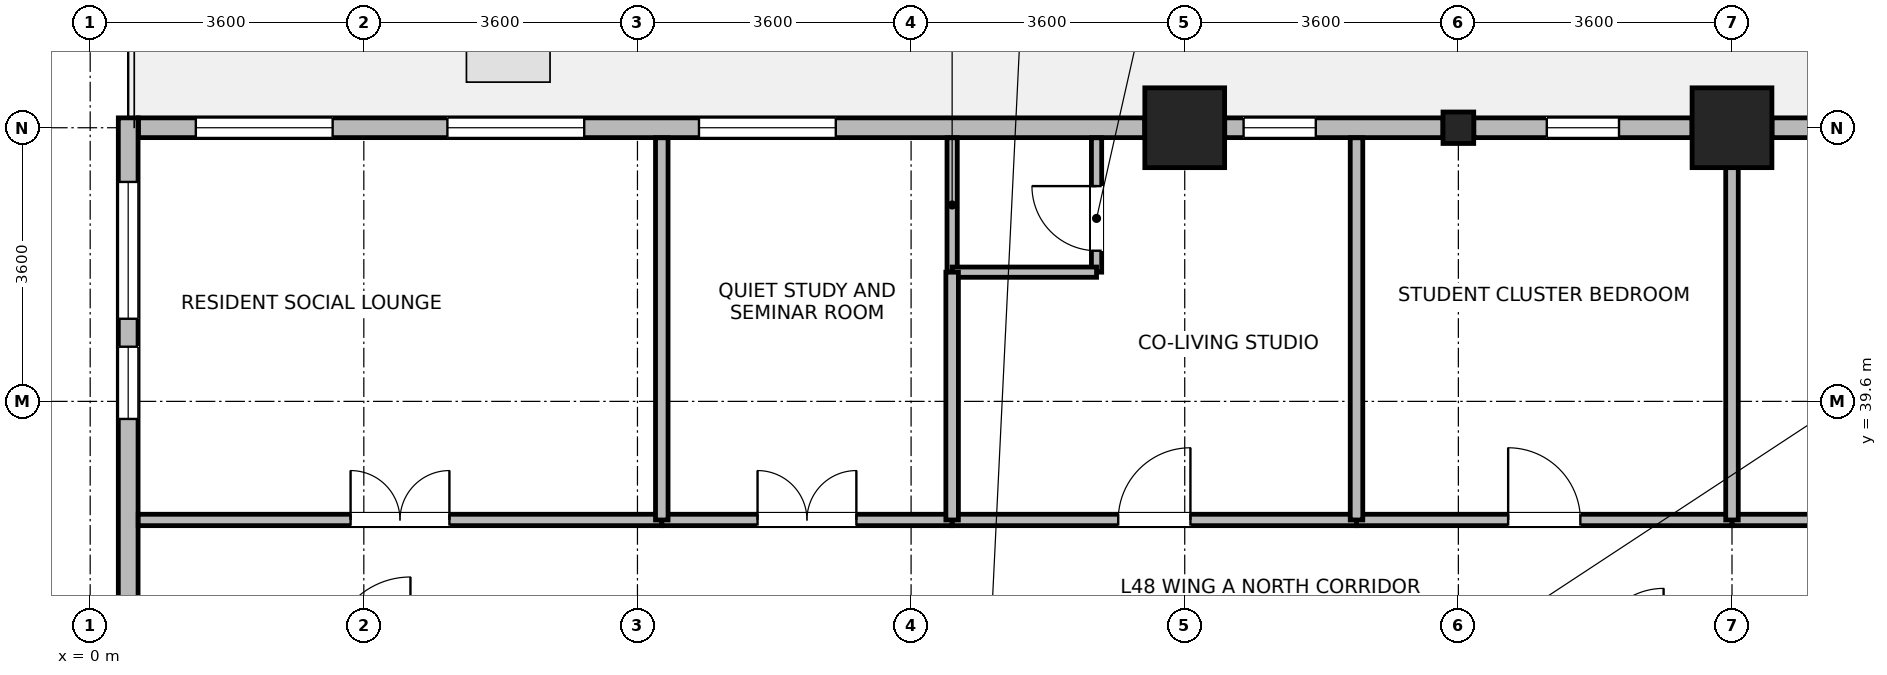
"""IFC4 building model, lengths in metres.
Left out: names, types, materials, properties, quantities, classifications, styles, units other than length and angle.
Written with IfcOpenShell. Run it as: python <this file> out.ifc"""

import sys

from ifc_helpers import new_model, si_unit, direction, frame, frame_2d, origin, origin_2d, place, context, subcontext, project, spatial, rectangle, i_section, extrude, source, transform, mapped, element, fill, save


model = new_model("IFC4")
c1 = context("Model", 3, precision=1e-05, world=origin(), true_north=direction((0.0, 1.0)))
c2 = subcontext(c1, "Body", "Model", "MODEL_VIEW")
j1 = project(units=[si_unit("LENGTHUNIT", "METRE"), si_unit("PLANEANGLEUNIT", "RADIAN")], contexts=[c1])
p1 = place(None, origin())
s1 = spatial("IfcSite", under=j1, at=p1, CompositionType="ELEMENT")
p2 = place(p1, origin())
s2 = spatial("IfcBuilding", under=s1, at=p2, CompositionType="ELEMENT")
p3 = place(p2, frame((0.0, 0.0, 188.3)))
s3 = spatial("IfcBuildingStorey", under=s2, at=p3, CompositionType="ELEMENT", Elevation=188.3)
m1 = source(origin(), c2, "Body", "SweptSolid", [
    extrude(rectangle(XDim=1.05, YDim=1.05, at=origin_2d()), origin(), (0.0, 0.0, 1.0), 3.7),
])
for number, where, z_axis, x_axis in (
    (1, (14.4, 43.2, 0.0), (0.0, 0.0, 1.0), (1.0, 0.0, 0.0)),
    (2, (21.6, 43.2, 0.0), (0.0, 0.0, 1.0), (1.0, 0.0, 0.0)),
):
    element("IfcColumn", number, at=place(p3, frame(where, z_axis=z_axis, x_axis=x_axis)), inside=s3, PredefinedType="COLUMN", context=c2, shape_type="MappedRepresentation", body=[
        mapped(m1, transform((0.0, 0.0, 0.0), x_axis=(1.0, 0.0, 0.0), y_axis=(0.0, 1.0, 0.0), z_axis=(0.0, 0.0, 1.0), scale=1.0)),
    ])
m2 = source(origin(), c2, "Body", "SweptSolid", [
    extrude(i_section(OverallWidth=0.404, OverallDepth=0.414, WebThickness=0.021, FlangeThickness=0.028, FilletRadius=0.015, at=origin_2d()), origin(), (0.0, 0.0, 1.0), 3.7),
])
p4 = place(p3, frame((18.0, 43.2, 0.0), z_axis=(0.0, 0.0, 1.0), x_axis=(1.0, 0.0, 0.0)))
e3 = element("IfcColumn", 3, at=p4, inside=s3, PredefinedType="COLUMN", context=c2, shape_type="MappedRepresentation", body=[
    mapped(m2, transform((0.0, 0.0, 0.0), x_axis=(1.0, 0.0, 0.0), y_axis=(0.0, 1.0, 0.0), z_axis=(0.0, 0.0, 1.0), scale=1.0)),
])
p5 = place(p3, frame((22.126, 43.2, 0.0), z_axis=(0.0, 0.0, 1.0), x_axis=(1.0, 0.0, 0.0)))
e4 = element("IfcWall", 4, at=p5, inside=s3, PredefinedType="STANDARD", context=c2, shape_type="SweptSolid", body=[
    extrude(rectangle(XDim=2.871, YDim=0.26, at=frame_2d((1.436, 0.0))), origin(), (0.0, 0.0, 1.0), 2.87),
])
p6 = place(p5, frame((0.96, 0.0, 0.85)))
e5 = element("IfcOpeningElement", 5, at=p6, cuts=e4, PredefinedType="OPENING", context=c2, shape_type="SweptSolid", body=[
    extrude(rectangle(XDim=0.95, YDim=1.75, at=frame_2d((0.475, 0.875))), frame((0.0, 0.14, 0.0), z_axis=(0.0, -1.0, 0.0), x_axis=(1.0, 0.0, 0.0)), (0.0, 0.0, 1.0), 0.28),
])
p7 = place(p3, frame((18.203, 43.2, 0.0), z_axis=(0.0, 0.0, 1.0), x_axis=(1.0, 0.0, 0.0)))
e6 = element("IfcWall", 6, at=p7, inside=s3, PredefinedType="STANDARD", context=c2, shape_type="SweptSolid", body=[
    extrude(rectangle(XDim=2.871, YDim=0.26, at=frame_2d((1.436, 0.0))), origin(), (0.0, 0.0, 1.0), 2.87),
])
p8 = place(p7, frame((0.96, 0.0, 0.85)))
e7 = element("IfcOpeningElement", 7, at=p8, cuts=e6, PredefinedType="OPENING", context=c2, shape_type="SweptSolid", body=[
    extrude(rectangle(XDim=0.95, YDim=1.75, at=frame_2d((0.475, 0.875))), frame((0.0, 0.14, 0.0), z_axis=(0.0, -1.0, 0.0), x_axis=(1.0, 0.0, 0.0)), (0.0, 0.0, 1.0), 0.28),
])
p9 = place(p3, frame((14.926, 43.2, 0.0), z_axis=(0.0, 0.0, 1.0), x_axis=(1.0, 0.0, 0.0)))
e8 = element("IfcWall", 8, at=p9, inside=s3, PredefinedType="STANDARD", context=c2, shape_type="SweptSolid", body=[
    extrude(rectangle(XDim=2.871, YDim=0.26, at=frame_2d((1.436, 0.0))), origin(), (0.0, 0.0, 1.0), 2.87),
])
p10 = place(p9, frame((0.249, 0.0, 0.85)))
e9 = element("IfcOpeningElement", 9, at=p10, cuts=e8, PredefinedType="OPENING", context=c2, shape_type="SweptSolid", body=[
    extrude(rectangle(XDim=0.95, YDim=1.75, at=frame_2d((0.475, 0.875))), frame((0.0, 0.14, 0.0), z_axis=(0.0, -1.0, 0.0), x_axis=(1.0, 0.0, 0.0)), (0.0, 0.0, 1.0), 0.28),
])
p11 = place(p3, frame((0.635, 43.2, 0.0), z_axis=(0.0, 0.0, 1.0), x_axis=(1.0, 0.0, 0.0)))
e10 = element("IfcWall", 10, at=p11, inside=s3, PredefinedType="STANDARD", context=c2, shape_type="SweptSolid", body=[
    extrude(rectangle(XDim=13.239, YDim=0.26, at=frame_2d((6.62, 0.0))), origin(), (0.0, 0.0, 1.0), 3.32),
])
p12 = place(p11, frame((0.755, 0.0, 0.85)))
e11 = element("IfcOpeningElement", 11, at=p12, cuts=e10, PredefinedType="OPENING", context=c2, shape_type="SweptSolid", body=[
    extrude(rectangle(XDim=1.8, YDim=1.85, at=frame_2d((0.9, 0.925))), frame((0.0, 0.14, 0.0), z_axis=(0.0, -1.0, 0.0), x_axis=(1.0, 0.0, 0.0)), (0.0, 0.0, 1.0), 0.28),
])
p13 = place(p11, frame((4.065, 0.0, 0.85)))
e12 = element("IfcOpeningElement", 12, at=p13, cuts=e10, PredefinedType="OPENING", context=c2, shape_type="SweptSolid", body=[
    extrude(rectangle(XDim=1.8, YDim=1.85, at=frame_2d((0.9, 0.925))), frame((0.0, 0.14, 0.0), z_axis=(0.0, -1.0, 0.0), x_axis=(1.0, 0.0, 0.0)), (0.0, 0.0, 1.0), 0.28),
])
p14 = place(p11, frame((7.375, 0.0, 0.85)))
e13 = element("IfcOpeningElement", 13, at=p14, cuts=e10, PredefinedType="OPENING", context=c2, shape_type="SweptSolid", body=[
    extrude(rectangle(XDim=1.8, YDim=1.85, at=frame_2d((0.9, 0.925))), frame((0.0, 0.14, 0.0), z_axis=(0.0, -1.0, 0.0), x_axis=(1.0, 0.0, 0.0)), (0.0, 0.0, 1.0), 0.28),
])
p15 = place(p3, frame((0.5, 36.358, 0.0), z_axis=(0.0, 0.0, 1.0), x_axis=(0.0, 1.0, 0.0)))
e14 = element("IfcWall", 14, at=p15, inside=s3, PredefinedType="STANDARD", context=c2, shape_type="SweptSolid", body=[
    extrude(rectangle(XDim=6.972, YDim=0.26, at=frame_2d((3.486, 0.0))), origin(), (0.0, 0.0, 1.0), 3.32),
])
p16 = place(p15, frame((4.329, 0.0, 0.85)))
e15 = element("IfcOpeningElement", 15, at=p16, cuts=e14, PredefinedType="OPENING", context=c2, shape_type="SweptSolid", body=[
    extrude(rectangle(XDim=1.8, YDim=1.85, at=frame_2d((0.9, 0.925))), frame((0.0, 0.14, 0.0), z_axis=(0.0, -1.0, 0.0), x_axis=(1.0, 0.0, 0.0)), (0.0, 0.0, 1.0), 0.28),
])
p17 = place(p15, frame((3.011, 0.0, 0.85)))
e16 = element("IfcOpeningElement", 16, at=p17, cuts=e14, PredefinedType="OPENING", context=c2, shape_type="SweptSolid", body=[
    extrude(rectangle(XDim=0.95, YDim=1.75, at=frame_2d((0.475, 0.875))), frame((0.0, 0.14, 0.0), z_axis=(0.0, -1.0, 0.0), x_axis=(1.0, 0.0, 0.0)), (0.0, 0.0, 1.0), 0.28),
])
p18 = place(p3, frame((11.34, 41.3, 0.0), z_axis=(0.0, 0.0, 1.0), x_axis=(0.0, 1.0, 0.0)))
e17 = element("IfcWall", 17, at=p18, inside=s3, PredefinedType="PARTITIONING", context=c2, shape_type="SweptSolid", body=[
    extrude(rectangle(XDim=1.768, YDim=0.135, at=frame_2d((0.884, 0.0))), origin(), (0.0, 0.0, 1.0), 3.32),
])
p19 = place(p3, frame((13.24, 41.3, 0.0), z_axis=(0.0, 0.0, 1.0), x_axis=(0.0, 1.0, 0.0)))
e18 = element("IfcWall", 18, at=p19, inside=s3, PredefinedType="PARTITIONING", context=c2, shape_type="SweptSolid", body=[
    extrude(rectangle(XDim=1.768, YDim=0.135, at=frame_2d((0.884, 0.0))), origin(), (0.0, 0.0, 1.0), 3.32),
])
p20 = place(p19, frame((0.282, 0.0, 0.0)))
e19 = element("IfcOpeningElement", 19, at=p20, cuts=e18, PredefinedType="OPENING", context=c2, shape_type="SweptSolid", body=[
    extrude(rectangle(XDim=0.85, YDim=2.04, at=frame_2d((0.425, 1.02))), frame((0.0, 0.078, 0.0), z_axis=(0.0, -1.0, 0.0), x_axis=(1.0, 0.0, 0.0)), (0.0, 0.0, 1.0), 0.155),
])
p21 = place(p3, frame((11.34, 41.3, 0.0), z_axis=(0.0, 0.0, 1.0), x_axis=(1.0, 0.0, 0.0)))
e20 = element("IfcWall", 20, at=p21, inside=s3, PredefinedType="PARTITIONING", context=c2, shape_type="SweptSolid", body=[
    extrude(rectangle(XDim=1.9, YDim=0.135, at=frame_2d((0.95, 0.0))), origin(), (0.0, 0.0, 1.0), 3.32),
])
p22 = place(p3, frame((21.6, 38.04, 0.0), z_axis=(0.0, 0.0, 1.0), x_axis=(1.0, 0.0, 0.0)))
e21 = element("IfcWall", 21, at=p22, inside=s3, PredefinedType="PARTITIONING", context=c2, shape_type="SweptSolid", body=[
    extrude(rectangle(XDim=7.1, YDim=0.15, at=frame_2d((3.55, 0.0))), origin(), (0.0, 0.0, 1.0), 3.32),
])
p23 = place(p22, frame((3.1, 0.0, 0.0)))
e22 = element("IfcOpeningElement", 22, at=p23, cuts=e21, PredefinedType="OPENING", context=c2, shape_type="SweptSolid", body=[
    extrude(rectangle(XDim=0.9, YDim=2.08, at=frame_2d((0.45, 1.04))), frame((0.0, 0.085, 0.0), z_axis=(0.0, -1.0, 0.0), x_axis=(1.0, 0.0, 0.0)), (0.0, 0.0, 1.0), 0.17),
])
p24 = place(p3, frame((0.632, 38.04, 0.0), z_axis=(0.0, 0.0, 1.0), x_axis=(1.0, 0.0, 0.0)))
e23 = element("IfcWall", 23, at=p24, inside=s3, PredefinedType="PARTITIONING", context=c2, shape_type="SweptSolid", body=[
    extrude(rectangle(XDim=6.888, YDim=0.15, at=frame_2d((3.444, 0.0))), origin(), (0.0, 0.0, 1.0), 3.32),
])
p25 = place(p24, frame((2.794, 0.0, 0.0)))
e24 = element("IfcOpeningElement", 24, at=p25, cuts=e23, PredefinedType="OPENING", context=c2, shape_type="SweptSolid", body=[
    extrude(rectangle(XDim=1.3, YDim=2.12, at=frame_2d((0.65, 1.06))), frame((0.0, 0.085, 0.0), z_axis=(0.0, -1.0, 0.0), x_axis=(1.0, 0.0, 0.0)), (0.0, 0.0, 1.0), 0.17),
])
p26 = place(p3, frame((11.34, 38.04, 0.0), z_axis=(0.0, 0.0, 1.0), x_axis=(1.0, 0.0, 0.0)))
e25 = element("IfcWall", 25, at=p26, inside=s3, PredefinedType="PARTITIONING", context=c2, shape_type="SweptSolid", body=[
    extrude(rectangle(XDim=5.32, YDim=0.15, at=frame_2d((2.66, 0.0))), origin(), (0.0, 0.0, 1.0), 3.32),
])
p27 = place(p26, frame((2.185, 0.0, 0.0)))
e26 = element("IfcOpeningElement", 26, at=p27, cuts=e25, PredefinedType="OPENING", context=c2, shape_type="SweptSolid", body=[
    extrude(rectangle(XDim=0.95, YDim=2.1, at=frame_2d((0.475, 1.05))), frame((0.0, 0.085, 0.0), z_axis=(0.0, -1.0, 0.0), x_axis=(1.0, 0.0, 0.0)), (0.0, 0.0, 1.0), 0.17),
])
p28 = place(p3, frame((16.66, 38.04, 0.0), z_axis=(0.0, 0.0, 1.0), x_axis=(1.0, 0.0, 0.0)))
e27 = element("IfcWall", 27, at=p28, inside=s3, PredefinedType="PARTITIONING", context=c2, shape_type="SweptSolid", body=[
    extrude(rectangle(XDim=4.94, YDim=0.15, at=frame_2d((2.47, 0.0))), origin(), (0.0, 0.0, 1.0), 3.32),
])
p29 = place(p28, frame((1.995, 0.0, 0.0)))
e28 = element("IfcOpeningElement", 28, at=p29, cuts=e27, PredefinedType="OPENING", context=c2, shape_type="SweptSolid", body=[
    extrude(rectangle(XDim=0.95, YDim=2.1, at=frame_2d((0.475, 1.05))), frame((0.0, 0.085, 0.0), z_axis=(0.0, -1.0, 0.0), x_axis=(1.0, 0.0, 0.0)), (0.0, 0.0, 1.0), 0.17),
])
p30 = place(p3, frame((7.52, 38.04, 0.0), z_axis=(0.0, 0.0, 1.0), x_axis=(1.0, 0.0, 0.0)))
e29 = element("IfcWall", 29, at=p30, inside=s3, PredefinedType="PARTITIONING", context=c2, shape_type="SweptSolid", body=[
    extrude(rectangle(XDim=3.82, YDim=0.15, at=frame_2d((1.91, 0.0))), origin(), (0.0, 0.0, 1.0), 3.32),
])
p31 = place(p30, frame((1.26, 0.0, 0.0)))
e30 = element("IfcOpeningElement", 30, at=p31, cuts=e29, PredefinedType="OPENING", context=c2, shape_type="SweptSolid", body=[
    extrude(rectangle(XDim=1.3, YDim=2.12, at=frame_2d((0.65, 1.06))), frame((0.0, 0.085, 0.0), z_axis=(0.0, -1.0, 0.0), x_axis=(1.0, 0.0, 0.0)), (0.0, 0.0, 1.0), 0.17),
])
for number, where, z_axis, x_axis in (
    (31, (7.52, 38.04, 0.0), (0.0, 0.0, 1.0), (0.0, 1.0, 0.0)),
    (32, (16.66, 38.04, 0.0), (0.0, 0.0, 1.0), (0.0, 1.0, 0.0)),
):
    element("IfcWall", number, at=place(p3, frame(where, z_axis=z_axis, x_axis=x_axis)), inside=s3, PredefinedType="PARTITIONING", context=c2, shape_type="SweptSolid", body=[
        extrude(rectangle(XDim=5.028, YDim=0.165, at=frame_2d((2.514, 0.0))), origin(), (0.0, 0.0, 1.0), 3.32),
    ])
p32 = place(p3, frame((21.6, 38.04, 0.0), z_axis=(0.0, 0.0, 1.0), x_axis=(0.0, 1.0, 0.0)))
e33 = element("IfcWall", 33, at=p32, inside=s3, PredefinedType="PARTITIONING", context=c2, shape_type="SweptSolid", body=[
    extrude(rectangle(XDim=5.028, YDim=0.165, at=frame_2d((2.514, 0.0))), origin(), (0.0, 0.0, 1.0), 2.87),
])
p33 = place(p3, frame((11.34, 38.04, 0.0), z_axis=(0.0, 0.0, 1.0), x_axis=(0.0, 1.0, 0.0)))
e34 = element("IfcWall", 34, at=p33, inside=s3, PredefinedType="PARTITIONING", context=c2, shape_type="SweptSolid", body=[
    extrude(rectangle(XDim=3.26, YDim=0.165, at=frame_2d((1.63, 0.0))), origin(), (0.0, 0.0, 1.0), 3.32),
])
p34 = place(p8, origin())
e35 = element("IfcWindow", 35, at=p34, inside=s3, PartitioningType="SINGLE_PANEL", PredefinedType="WINDOW", context=c2, shape_type="SweptSolid", body=[
    extrude(rectangle(XDim=0.95, YDim=1.75, at=frame_2d((0.475, 0.875))), frame((0.0, 0.03, 0.0), z_axis=(0.0, -1.0, 0.0), x_axis=(1.0, 0.0, 0.0)), (0.0, 0.0, 1.0), 0.06),
])
fill(e7, e35)
p35 = place(p10, origin())
e36 = element("IfcWindow", 36, at=p35, inside=s3, PartitioningType="SINGLE_PANEL", PredefinedType="WINDOW", context=c2, shape_type="SweptSolid", body=[
    extrude(rectangle(XDim=0.95, YDim=1.75, at=frame_2d((0.475, 0.875))), frame((0.0, 0.03, 0.0), z_axis=(0.0, -1.0, 0.0), x_axis=(1.0, 0.0, 0.0)), (0.0, 0.0, 1.0), 0.06),
])
fill(e9, e36)
p36 = place(p12, origin())
e37 = element("IfcWindow", 37, at=p36, inside=s3, PartitioningType="SINGLE_PANEL", PredefinedType="WINDOW", context=c2, shape_type="SweptSolid", body=[
    extrude(rectangle(XDim=1.8, YDim=1.85, at=frame_2d((0.9, 0.925))), frame((0.0, 0.03, 0.0), z_axis=(0.0, -1.0, 0.0), x_axis=(1.0, 0.0, 0.0)), (0.0, 0.0, 1.0), 0.06),
])
fill(e11, e37)
p37 = place(p13, origin())
e38 = element("IfcWindow", 38, at=p37, inside=s3, PartitioningType="SINGLE_PANEL", PredefinedType="WINDOW", context=c2, shape_type="SweptSolid", body=[
    extrude(rectangle(XDim=1.8, YDim=1.85, at=frame_2d((0.9, 0.925))), frame((0.0, 0.03, 0.0), z_axis=(0.0, -1.0, 0.0), x_axis=(1.0, 0.0, 0.0)), (0.0, 0.0, 1.0), 0.06),
])
fill(e12, e38)
p38 = place(p14, origin())
e39 = element("IfcWindow", 39, at=p38, inside=s3, PartitioningType="SINGLE_PANEL", PredefinedType="WINDOW", context=c2, shape_type="SweptSolid", body=[
    extrude(rectangle(XDim=1.8, YDim=1.85, at=frame_2d((0.9, 0.925))), frame((0.0, 0.03, 0.0), z_axis=(0.0, -1.0, 0.0), x_axis=(1.0, 0.0, 0.0)), (0.0, 0.0, 1.0), 0.06),
])
fill(e13, e39)
p39 = place(p16, origin())
e40 = element("IfcWindow", 40, at=p39, inside=s3, PartitioningType="SINGLE_PANEL", PredefinedType="WINDOW", context=c2, shape_type="SweptSolid", body=[
    extrude(rectangle(XDim=1.8, YDim=1.85, at=frame_2d((0.9, 0.925))), frame((0.0, 0.03, 0.0), z_axis=(0.0, -1.0, 0.0), x_axis=(1.0, 0.0, 0.0)), (0.0, 0.0, 1.0), 0.06),
])
fill(e15, e40)
p40 = place(p17, origin())
e41 = element("IfcWindow", 41, at=p40, inside=s3, PartitioningType="SINGLE_PANEL", PredefinedType="WINDOW", context=c2, shape_type="SweptSolid", body=[
    extrude(rectangle(XDim=0.95, YDim=1.75, at=frame_2d((0.475, 0.875))), frame((0.0, 0.03, 0.0), z_axis=(0.0, -1.0, 0.0), x_axis=(1.0, 0.0, 0.0)), (0.0, 0.0, 1.0), 0.06),
])
fill(e16, e41)
p41 = place(p20, origin())
e42 = element("IfcDoor", 42, at=p41, inside=s3, OperationType="SINGLE_SWING_RIGHT", PredefinedType="DOOR", context=c2, shape_type="SweptSolid", body=[
    extrude(rectangle(XDim=0.85, YDim=2.04, at=frame_2d((0.425, 1.02))), frame((0.0, 0.025, 0.0), z_axis=(0.0, -1.0, 0.0), x_axis=(1.0, 0.0, 0.0)), (0.0, 0.0, 1.0), 0.05),
])
fill(e19, e42)
p42 = place(p25, origin())
e43 = element("IfcDoor", 43, at=p42, inside=s3, OperationType="DOUBLE_DOOR_SINGLE_SWING", PredefinedType="DOOR", context=c2, shape_type="SweptSolid", body=[
    extrude(rectangle(XDim=1.3, YDim=2.12, at=frame_2d((0.65, 1.06))), frame((0.0, 0.025, 0.0), z_axis=(0.0, -1.0, 0.0), x_axis=(1.0, 0.0, 0.0)), (0.0, 0.0, 1.0), 0.05),
])
fill(e24, e43)
p43 = place(p27, origin())
e44 = element("IfcDoor", 44, at=p43, inside=s3, OperationType="SINGLE_SWING_RIGHT", PredefinedType="DOOR", context=c2, shape_type="SweptSolid", body=[
    extrude(rectangle(XDim=0.95, YDim=2.1, at=frame_2d((0.475, 1.05))), frame((0.0, 0.025, 0.0), z_axis=(0.0, -1.0, 0.0), x_axis=(1.0, 0.0, 0.0)), (0.0, 0.0, 1.0), 0.05),
])
fill(e26, e44)
p44 = place(p29, origin())
e45 = element("IfcDoor", 45, at=p44, inside=s3, OperationType="SINGLE_SWING_LEFT", PredefinedType="DOOR", context=c2, shape_type="SweptSolid", body=[
    extrude(rectangle(XDim=0.95, YDim=2.1, at=frame_2d((0.475, 1.05))), frame((0.0, 0.025, 0.0), z_axis=(0.0, -1.0, 0.0), x_axis=(1.0, 0.0, 0.0)), (0.0, 0.0, 1.0), 0.05),
])
fill(e28, e45)
p45 = place(p31, origin())
e46 = element("IfcDoor", 46, at=p45, inside=s3, OperationType="DOUBLE_DOOR_SINGLE_SWING", PredefinedType="DOOR", context=c2, shape_type="SweptSolid", body=[
    extrude(rectangle(XDim=1.3, YDim=2.12, at=frame_2d((0.65, 1.06))), frame((0.0, 0.025, 0.0), z_axis=(0.0, -1.0, 0.0), x_axis=(1.0, 0.0, 0.0)), (0.0, 0.0, 1.0), 0.05),
])
fill(e30, e46)
save(model, sys.argv[1])
